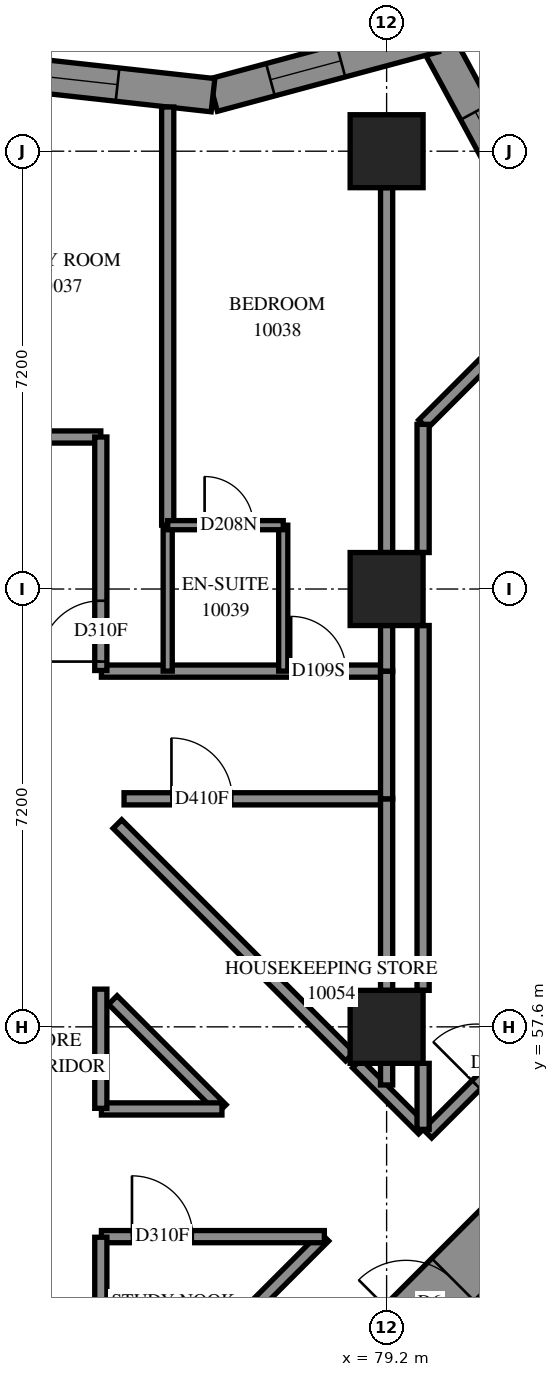
"""IFC4 building model, lengths in metres.
Left out: names, types, materials, properties, quantities, classifications, styles, units other than length and angle.
Written with IfcOpenShell. Run it as: python <this file> out.ifc"""

import sys

from ifc_helpers import new_model, si_unit, direction, frame, frame_2d, origin, origin_2d, place, context, subcontext, project, spatial, polyline, rectangle, outline, extrude, element, fill, save


model = new_model("IFC4")
c1 = context("Model", 3, precision=1e-05, world=origin(), true_north=direction((0.0, 1.0)))
c2 = subcontext(c1, "Body", "Model", "MODEL_VIEW")
j1 = project(units=[si_unit("LENGTHUNIT", "METRE"), si_unit("PLANEANGLEUNIT", "RADIAN")], contexts=[c1])
p1 = place(None, origin())
s1 = spatial("IfcSite", under=j1, at=p1, CompositionType="ELEMENT")
p2 = place(p1, origin())
s2 = spatial("IfcBuilding", under=s1, at=p2, CompositionType="ELEMENT")
p3 = place(p2, frame((0.0, 0.0, 40.6)))
s3 = spatial("IfcBuildingStorey", under=s2, at=p3, CompositionType="ELEMENT", Elevation=40.6)
for number, where, z_axis, x_axis in (
    (1, (79.2, 57.6, 0.0), (0.0, 0.0, 1.0), (1.0, 0.0, 0.0)),
    (2, (79.2, 64.8, 0.0), (0.0, 0.0, 1.0), (1.0, 0.0, 0.0)),
    (3, (79.2, 72.0, 0.0), (0.0, 0.0, 1.0), (1.0, 0.0, 0.0)),
):
    element("IfcColumn", number, at=place(p3, frame(where, z_axis=z_axis, x_axis=x_axis)), inside=s3, PredefinedType="COLUMN", context=c2, shape_type="SweptSolid", body=[
        extrude(rectangle(XDim=1.2, YDim=1.2, at=origin_2d()), origin(), (0.0, 0.0, 1.0), 3.1),
    ])
p4 = place(p3, frame((76.301, 49.443, -0.3), z_axis=(0.0, 0.0, 1.0), x_axis=(0.7071067812, 0.7071067812, 0.0)))
e4 = element("IfcWall", 4, at=p4, inside=s3, PredefinedType="SHEAR", context=c2, shape_type="SweptSolid", body=[
    extrude(rectangle(XDim=14.4, YDim=1.0, at=frame_2d((7.2, 0.0))), origin(), (0.0, 0.0, 1.0), 2.7),
])
p5 = place(p4, frame((4.55, 0.0, 0.3)))
e5 = element("IfcOpeningElement", 5, at=p5, cuts=e4, PredefinedType="OPENING", context=c2, shape_type="SweptSolid", body=[
    extrude(rectangle(XDim=1.1, YDim=2.1, at=frame_2d((0.55, 1.05))), frame((0.0, 0.51, 0.0), z_axis=(0.0, -1.0, 0.0), x_axis=(1.0, 0.0, 0.0)), (0.0, 0.0, 1.0), 1.02),
])
p6 = place(p4, frame((11.35, 0.0, 0.3)))
e6 = element("IfcOpeningElement", 6, at=p6, cuts=e4, PredefinedType="OPENING", context=c2, shape_type="SweptSolid", body=[
    extrude(rectangle(XDim=1.1, YDim=2.1, at=frame_2d((0.55, 1.05))), frame((0.0, 0.51, 0.0), z_axis=(0.0, -1.0, 0.0), x_axis=(1.0, 0.0, 0.0)), (0.0, 0.0, 1.0), 1.02),
])
p7 = place(p3, frame((81.611, 70.891, 0.0), z_axis=(0.0, 0.0, 1.0), x_axis=(-0.4761692104, 0.8793536735, 0.0)))
e7 = element("IfcWall", 7, at=p7, inside=s3, PredefinedType="SOLIDWALL", context=c2, shape_type="SweptSolid", body=[
    extrude(outline(polyline([(0.057, -0.275), (3.639, -0.275), (3.204, 0.275), (-0.057, 0.275), (0.057, -0.275)])), origin(), (0.0, 0.0, 1.0), 3.1),
])
p8 = place(p7, frame((0.798, 0.0, 0.5)))
e8 = element("IfcOpeningElement", 8, at=p8, cuts=e7, PredefinedType="OPENING", context=c2, shape_type="SweptSolid", body=[
    extrude(rectangle(XDim=1.2, YDim=2.45, at=frame_2d((0.6, 1.225))), frame((0.0, 0.285, 0.0), z_axis=(0.0, -1.0, 0.0), x_axis=(1.0, 0.0, 0.0)), (0.0, 0.0, 1.0), 0.57),
])
p9 = place(p3, frame((79.982, 73.899, 0.0), z_axis=(0.0, 0.0, 1.0), x_axis=(-0.9656880232, -0.259704913, 0.0)))
e9 = element("IfcWall", 9, at=p9, inside=s3, PredefinedType="SOLIDWALL", context=c2, shape_type="SweptSolid", body=[
    extrude(outline(polyline([(-0.217, -0.275), (3.714, -0.275), (3.818, 0.275), (0.217, 0.275), (-0.217, -0.275)])), origin(), (0.0, 0.0, 1.0), 3.1),
])
p10 = place(p9, frame((1.588, 0.0, 0.5)))
e10 = element("IfcOpeningElement", 10, at=p10, cuts=e9, PredefinedType="OPENING", context=c2, shape_type="SweptSolid", body=[
    extrude(rectangle(XDim=1.2, YDim=2.45, at=frame_2d((0.6, 1.225))), frame((0.0, 0.285, 0.0), z_axis=(0.0, -1.0, 0.0), x_axis=(1.0, 0.0, 0.0)), (0.0, 0.0, 1.0), 0.57),
])
p11 = place(p3, frame((76.345, 72.921, 0.0), z_axis=(0.0, 0.0, 1.0), x_axis=(-0.9939087915, 0.1102057815, 0.0)))
e11 = element("IfcWall", 11, at=p11, inside=s3, PredefinedType="SOLIDWALL", context=c2, shape_type="SweptSolid", body=[
    extrude(outline(polyline([(0.052, -0.275), (3.872, -0.275), (3.811, 0.275), (-0.052, 0.275), (0.052, -0.275)])), origin(), (0.0, 0.0, 1.0), 3.1),
])
p12 = place(p11, frame((1.58, 0.0, 0.5)))
e12 = element("IfcOpeningElement", 12, at=p12, cuts=e11, PredefinedType="OPENING", context=c2, shape_type="SweptSolid", body=[
    extrude(rectangle(XDim=1.2, YDim=2.45, at=frame_2d((0.6, 1.225))), frame((0.0, 0.285, 0.0), z_axis=(0.0, -1.0, 0.0), x_axis=(1.0, 0.0, 0.0)), (0.0, 0.0, 1.0), 0.57),
])
p13 = place(p3, frame((55.1, 67.3, 0.0), z_axis=(0.0, 0.0, 1.0), x_axis=(1.0, 0.0, 0.0)))
e13 = element("IfcWall", 13, at=p13, inside=s3, PredefinedType="PARTITIONING", context=c2, shape_type="SweptSolid", body=[
    extrude(rectangle(XDim=19.4, YDim=0.2, at=frame_2d((9.7, 0.0))), origin(), (0.0, 0.0, 1.0), 3.1),
])
p14 = place(p13, frame((6.399, 0.0, 0.0)))
e14 = element("IfcOpeningElement", 14, at=p14, cuts=e13, PredefinedType="OPENING", context=c2, shape_type="SweptSolid", body=[
    extrude(rectangle(XDim=0.9, YDim=2.1, at=frame_2d((0.45, 1.05))), frame((0.0, 0.11, 0.0), z_axis=(0.0, -1.0, 0.0), x_axis=(1.0, 0.0, 0.0)), (0.0, 0.0, 1.0), 0.22),
])
p15 = place(p13, frame((13.599, 0.0, 0.0)))
e15 = element("IfcOpeningElement", 15, at=p15, cuts=e13, PredefinedType="OPENING", context=c2, shape_type="SweptSolid", body=[
    extrude(rectangle(XDim=0.9, YDim=2.1, at=frame_2d((0.45, 1.05))), frame((0.0, 0.11, 0.0), z_axis=(0.0, -1.0, 0.0), x_axis=(1.0, 0.0, 0.0)), (0.0, 0.0, 1.0), 0.22),
])
p16 = place(p3, frame((79.871, 55.843, 0.0), z_axis=(0.0, 0.0, 1.0), x_axis=(0.7071067812, 0.7071067812, 0.0)))
e16 = element("IfcWall", 16, at=p16, inside=s3, PredefinedType="PARTITIONING", context=c2, shape_type="SweptSolid", body=[
    extrude(rectangle(XDim=9.85, YDim=0.2, at=frame_2d((4.925, 0.0))), origin(), (0.0, 0.0, 1.0), 3.1),
])
p17 = place(p16, frame((1.135, 0.0, 0.0)))
e17 = element("IfcOpeningElement", 17, at=p17, cuts=e16, PredefinedType="OPENING", context=c2, shape_type="SweptSolid", body=[
    extrude(rectangle(XDim=1.0, YDim=2.1, at=frame_2d((0.5, 1.05))), frame((0.0, 0.11, 0.0), z_axis=(0.0, -1.0, 0.0), x_axis=(1.0, 0.0, 0.0)), (0.0, 0.0, 1.0), 0.22),
])
p18 = place(p3, frame((75.6, 65.85, 0.0), z_axis=(0.0, 0.0, 1.0), x_axis=(0.0, 1.0, 0.0)))
e18 = element("IfcWall", 18, at=p18, inside=s3, PredefinedType="PARTITIONING", context=c2, shape_type="SweptSolid", body=[
    extrude(rectangle(XDim=6.877, YDim=0.2, at=frame_2d((3.438, 0.0))), origin(), (0.0, 0.0, 1.0), 3.1),
])
for number, where, z_axis, x_axis in (
    (19, (79.2, 65.4, 0.0), (0.0, 0.0, 1.0), (0.0, 1.0, 0.0)),
    (20, (79.8, 58.2, 0.0), (0.0, 0.0, 1.0), (0.0, 1.0, 0.0)),
):
    element("IfcWall", number, at=place(p3, frame(where, z_axis=z_axis, x_axis=x_axis)), inside=s3, PredefinedType="PARTITIONING", context=c2, shape_type="SweptSolid", body=[
        extrude(rectangle(XDim=6.0, YDim=0.2, at=frame_2d((3.0, 0.0))), origin(), (0.0, 0.0, 1.0), 3.1),
    ])
p19 = place(p3, frame((74.773, 60.935, 0.0), z_axis=(0.0, 0.0, 1.0), x_axis=(0.7071067812, -0.7071067812, 0.0)))
e21 = element("IfcWall", 21, at=p19, inside=s3, PredefinedType="PARTITIONING", context=c2, shape_type="SweptSolid", body=[
    extrude(rectangle(XDim=5.408, YDim=0.2, at=frame_2d((2.704, 0.0))), origin(), (0.0, 0.0, 1.0), 3.1),
])
p20 = place(p3, frame((74.517, 50.489, 0.0), z_axis=(0.0, 0.0, 1.0), x_axis=(0.7071067812, 0.7071067812, 0.0)))
e22 = element("IfcWall", 22, at=p20, inside=s3, PredefinedType="PARTITIONING", context=c2, shape_type="SweptSolid", body=[
    extrude(rectangle(XDim=5.176, YDim=0.2, at=frame_2d((2.588, 0.0))), origin(), (0.0, 0.0, 1.0), 3.1),
])
p21 = place(p3, frame((74.51, 63.45, 0.0), z_axis=(0.0, 0.0, 1.0), x_axis=(1.0, 0.0, 0.0)))
e23 = element("IfcWall", 23, at=p21, inside=s3, PredefinedType="PARTITIONING", context=c2, shape_type="SweptSolid", body=[
    extrude(rectangle(XDim=4.69, YDim=0.2, at=frame_2d((2.345, 0.0))), origin(), (0.0, 0.0, 1.0), 3.1),
])
p22 = place(p21, frame((3.12, 0.0, 0.0)))
e24 = element("IfcOpeningElement", 24, at=p22, cuts=e23, PredefinedType="OPENING", context=c2, shape_type="SweptSolid", body=[
    extrude(rectangle(XDim=0.9, YDim=2.1, at=frame_2d((0.45, 1.05))), frame((0.0, 0.11, 0.0), z_axis=(0.0, -1.0, 0.0), x_axis=(1.0, 0.0, 0.0)), (0.0, 0.0, 1.0), 0.22),
])
p23 = place(p3, frame((74.882, 61.35, 0.0), z_axis=(0.0, 0.0, 1.0), x_axis=(1.0, 0.0, 0.0)))
e25 = element("IfcWall", 25, at=p23, inside=s3, PredefinedType="PARTITIONING", context=c2, shape_type="SweptSolid", body=[
    extrude(rectangle(XDim=4.318, YDim=0.2, at=frame_2d((2.159, 0.0))), origin(), (0.0, 0.0, 1.0), 3.1),
])
p24 = place(p23, frame((0.78, 0.0, 0.0)))
e26 = element("IfcOpeningElement", 26, at=p24, cuts=e25, PredefinedType="OPENING", context=c2, shape_type="SweptSolid", body=[
    extrude(rectangle(XDim=1.0, YDim=2.1, at=frame_2d((0.5, 1.05))), frame((0.0, 0.11, 0.0), z_axis=(0.0, -1.0, 0.0), x_axis=(1.0, 0.0, 0.0)), (0.0, 0.0, 1.0), 0.22),
])
p25 = place(p3, frame((74.5, 63.46, 0.0), z_axis=(0.0, 0.0, 1.0), x_axis=(0.0, 1.0, 0.0)))
e27 = element("IfcWall", 27, at=p25, inside=s3, PredefinedType="PARTITIONING", context=c2, shape_type="SweptSolid", body=[
    extrude(rectangle(XDim=3.84, YDim=0.2, at=frame_2d((1.92, 0.0))), origin(), (0.0, 0.0, 1.0), 3.1),
])
p26 = place(p25, frame((0.147, 0.0, 0.0)))
e28 = element("IfcOpeningElement", 28, at=p26, cuts=e27, PredefinedType="OPENING", context=c2, shape_type="SweptSolid", body=[
    extrude(rectangle(XDim=1.0, YDim=2.1, at=frame_2d((0.5, 1.05))), frame((0.0, 0.11, 0.0), z_axis=(0.0, -1.0, 0.0), x_axis=(1.0, 0.0, 0.0)), (0.0, 0.0, 1.0), 0.22),
])
p27 = place(p3, frame((74.51, 54.15, 0.0), z_axis=(0.0, 0.0, 1.0), x_axis=(1.0, 0.0, 0.0)))
e29 = element("IfcWall", 29, at=p27, inside=s3, PredefinedType="PARTITIONING", context=c2, shape_type="SweptSolid", body=[
    extrude(rectangle(XDim=3.666, YDim=0.2, at=frame_2d((1.833, 0.0))), origin(), (0.0, 0.0, 1.0), 3.1),
])
p28 = place(p27, frame((0.502, 0.0, 0.0)))
e30 = element("IfcOpeningElement", 30, at=p28, cuts=e29, PredefinedType="OPENING", context=c2, shape_type="SweptSolid", body=[
    extrude(rectangle(XDim=1.0, YDim=2.1, at=frame_2d((0.5, 1.05))), frame((0.0, 0.11, 0.0), z_axis=(0.0, -1.0, 0.0), x_axis=(1.0, 0.0, 0.0)), (0.0, 0.0, 1.0), 0.22),
])
p29 = place(p3, frame((74.5, 50.496, 0.0), z_axis=(0.0, 0.0, 1.0), x_axis=(0.0, 1.0, 0.0)))
e31 = element("IfcWall", 31, at=p29, inside=s3, PredefinedType="PARTITIONING", context=c2, shape_type="SweptSolid", body=[
    extrude(rectangle(XDim=3.644, YDim=0.2, at=frame_2d((1.822, 0.0))), origin(), (0.0, 0.0, 1.0), 3.1),
])
p30 = place(p3, frame((79.799, 67.509, 0.0), z_axis=(0.0, 0.0, 1.0), x_axis=(0.7070926216, 0.7071209405, 0.0)))
e32 = element("IfcWall", 32, at=p30, inside=s3, PredefinedType="PARTITIONING", context=c2, shape_type="SweptSolid", body=[
    extrude(rectangle(XDim=3.531, YDim=0.2, at=frame_2d((1.766, 0.0))), origin(), (0.0, 0.0, 1.0), 3.1),
])
p31 = place(p3, frame((79.2, 58.2, 0.0), z_axis=(0.0, 0.0, 1.0), x_axis=(0.0, 1.0, 0.0)))
e33 = element("IfcWall", 33, at=p31, inside=s3, PredefinedType="PARTITIONING", context=c2, shape_type="SweptSolid", body=[
    extrude(rectangle(XDim=3.15, YDim=0.2, at=frame_2d((1.575, 0.0))), origin(), (0.0, 0.0, 1.0), 3.1),
])
p32 = place(p3, frame((74.697, 58.041, 0.0), z_axis=(0.0, 0.0, 1.0), x_axis=(0.7071067812, -0.7071067812, 0.0)))
e34 = element("IfcWall", 34, at=p32, inside=s3, PredefinedType="PARTITIONING", context=c2, shape_type="SweptSolid", body=[
    extrude(rectangle(XDim=2.534, YDim=0.2, at=frame_2d((1.267, 0.0))), origin(), (0.0, 0.0, 1.0), 3.1),
])
for number, where, z_axis, x_axis in (
    (35, (75.6, 63.45, 0.0), (0.0, 0.0, 1.0), (0.0, 1.0, 0.0)),
    (36, (77.5, 63.45, 0.0), (0.0, 0.0, 1.0), (0.0, 1.0, 0.0)),
):
    element("IfcWall", number, at=place(p3, frame(where, z_axis=z_axis, x_axis=x_axis)), inside=s3, PredefinedType="PARTITIONING", context=c2, shape_type="SweptSolid", body=[
        extrude(rectangle(XDim=2.4, YDim=0.15, at=frame_2d((1.2, 0.0))), origin(), (0.0, 0.0, 1.0), 3.1),
    ])
p33 = place(p3, frame((79.8, 65.4, 0.0), z_axis=(0.0, 0.0, 1.0), x_axis=(0.0, 1.0, 0.0)))
e37 = element("IfcWall", 37, at=p33, inside=s3, PredefinedType="PARTITIONING", context=c2, shape_type="SweptSolid", body=[
    extrude(rectangle(XDim=2.108, YDim=0.2, at=frame_2d((1.054, 0.0))), origin(), (0.0, 0.0, 1.0), 3.1),
])
p34 = place(p3, frame((79.2, 61.35, 0.0), z_axis=(0.0, 0.0, 1.0), x_axis=(0.0, 1.0, 0.0)))
e38 = element("IfcWall", 38, at=p34, inside=s3, PredefinedType="PARTITIONING", context=c2, shape_type="SweptSolid", body=[
    extrude(rectangle(XDim=2.1, YDim=0.2, at=frame_2d((1.05, 0.0))), origin(), (0.0, 0.0, 1.0), 3.1),
])
p35 = place(p3, frame((74.51, 56.25, 0.0), z_axis=(0.0, 0.0, 1.0), x_axis=(1.0, 0.0, 0.0)))
e39 = element("IfcWall", 39, at=p35, inside=s3, PredefinedType="PARTITIONING", context=c2, shape_type="SweptSolid", body=[
    extrude(rectangle(XDim=1.982, YDim=0.2, at=frame_2d((0.991, 0.0))), origin(), (0.0, 0.0, 1.0), 3.1),
])
p36 = place(p3, frame((74.5, 56.26, 0.0), z_axis=(0.0, 0.0, 1.0), x_axis=(0.0, 1.0, 0.0)))
e40 = element("IfcWall", 40, at=p36, inside=s3, PredefinedType="PARTITIONING", context=c2, shape_type="SweptSolid", body=[
    extrude(rectangle(XDim=1.96, YDim=0.2, at=frame_2d((0.98, 0.0))), origin(), (0.0, 0.0, 1.0), 3.1),
])
p37 = place(p3, frame((75.6, 65.85, 0.0), z_axis=(0.0, 0.0, 1.0), x_axis=(1.0, 0.0, 0.0)))
e41 = element("IfcWall", 41, at=p37, inside=s3, PredefinedType="PARTITIONING", context=c2, shape_type="SweptSolid", body=[
    extrude(rectangle(XDim=1.9, YDim=0.15, at=frame_2d((0.95, 0.0))), origin(), (0.0, 0.0, 1.0), 3.1),
])
p38 = place(p37, frame((0.607, 0.0, 0.0)))
e42 = element("IfcOpeningElement", 42, at=p38, cuts=e41, PredefinedType="OPENING", context=c2, shape_type="SweptSolid", body=[
    extrude(rectangle(XDim=0.8, YDim=2.1, at=frame_2d((0.4, 1.05))), frame((0.0, 0.085, 0.0), z_axis=(0.0, -1.0, 0.0), x_axis=(1.0, 0.0, 0.0)), (0.0, 0.0, 1.0), 0.17),
])
p39 = place(p3, frame((78.711, 56.997, 0.0), z_axis=(0.0, 0.0, 1.0), x_axis=(0.7071067812, -0.7071067812, 0.0)))
e43 = element("IfcWall", 43, at=p39, inside=s3, PredefinedType="PARTITIONING", context=c2, shape_type="SweptSolid", body=[
    extrude(rectangle(XDim=1.536, YDim=0.2, at=frame_2d((0.768, 0.0))), origin(), (0.0, 0.0, 1.0), 3.1),
])
p40 = place(p3, frame((79.8, 55.914, 0.0), z_axis=(0.0, 0.0, 1.0), x_axis=(0.0, 1.0, 0.0)))
e44 = element("IfcWall", 44, at=p40, inside=s3, PredefinedType="PARTITIONING", context=c2, shape_type="SweptSolid", body=[
    extrude(rectangle(XDim=1.086, YDim=0.2, at=frame_2d((0.543, 0.0))), origin(), (0.0, 0.0, 1.0), 3.1),
])
p41 = place(p3, frame((79.2, 63.45, 0.0), z_axis=(0.0, 0.0, 1.0), x_axis=(0.0, 1.0, 0.0)))
e45 = element("IfcWall", 45, at=p41, inside=s3, PredefinedType="PARTITIONING", context=c2, shape_type="SweptSolid", body=[
    extrude(rectangle(XDim=0.75, YDim=0.2, at=frame_2d((0.375, 0.0))), origin(), (0.0, 0.0, 1.0), 3.1),
])
p42 = place(p3, frame((79.2, 56.644, 0.0), z_axis=(0.0, 0.0, 1.0), x_axis=(0.0, 1.0, 0.0)))
e46 = element("IfcWall", 46, at=p42, inside=s3, PredefinedType="PARTITIONING", context=c2, shape_type="SweptSolid", body=[
    extrude(rectangle(XDim=0.356, YDim=0.2, at=frame_2d((0.178, 0.0))), origin(), (0.0, 0.0, 1.0), 3.1),
])
p43 = place(p8, origin())
e47 = element("IfcWindow", 47, at=p43, inside=s3, PartitioningType="SINGLE_PANEL", PredefinedType="WINDOW", context=c2, shape_type="SweptSolid", body=[
    extrude(rectangle(XDim=1.2, YDim=2.45, at=frame_2d((0.6, 1.225))), frame((0.0, 0.155, 0.0), z_axis=(0.0, -1.0, 0.0), x_axis=(1.0, 0.0, 0.0)), (0.0, 0.0, 1.0), 0.06),
])
fill(e8, e47)
p44 = place(p10, origin())
e48 = element("IfcWindow", 48, at=p44, inside=s3, PartitioningType="SINGLE_PANEL", PredefinedType="WINDOW", context=c2, shape_type="SweptSolid", body=[
    extrude(rectangle(XDim=1.2, YDim=2.45, at=frame_2d((0.6, 1.225))), frame((0.0, 0.155, 0.0), z_axis=(0.0, -1.0, 0.0), x_axis=(1.0, 0.0, 0.0)), (0.0, 0.0, 1.0), 0.06),
])
fill(e10, e48)
p45 = place(p12, origin())
e49 = element("IfcWindow", 49, at=p45, inside=s3, PartitioningType="SINGLE_PANEL", PredefinedType="WINDOW", context=c2, shape_type="SweptSolid", body=[
    extrude(rectangle(XDim=1.2, YDim=2.45, at=frame_2d((0.6, 1.225))), frame((0.0, 0.155, 0.0), z_axis=(0.0, -1.0, 0.0), x_axis=(1.0, 0.0, 0.0)), (0.0, 0.0, 1.0), 0.06),
])
fill(e12, e49)
p46 = place(p5, origin())
e50 = element("IfcDoor", 50, at=p46, inside=s3, OperationType="DOUBLE_DOOR_SINGLE_SWING", PredefinedType="DOOR", context=c2, shape_type="SweptSolid", body=[
    extrude(rectangle(XDim=1.1, YDim=2.1, at=frame_2d((0.55, 1.05))), frame((0.0, 0.025, 0.0), z_axis=(0.0, -1.0, 0.0), x_axis=(1.0, 0.0, 0.0)), (0.0, 0.0, 1.0), 0.05),
])
fill(e5, e50)
p47 = place(p28, origin())
e51 = element("IfcDoor", 51, at=p47, inside=s3, OperationType="SINGLE_SWING_RIGHT", PredefinedType="DOOR", context=c2, shape_type="SweptSolid", body=[
    extrude(rectangle(XDim=1.0, YDim=2.1, at=frame_2d((0.5, 1.05))), frame((0.0, 0.025, 0.0), z_axis=(0.0, -1.0, 0.0), x_axis=(1.0, 0.0, 0.0)), (0.0, 0.0, 1.0), 0.05),
])
fill(e30, e51)
p48 = place(p26, origin())
e52 = element("IfcDoor", 52, at=p48, inside=s3, OperationType="SINGLE_SWING_RIGHT", PredefinedType="DOOR", context=c2, shape_type="SweptSolid", body=[
    extrude(rectangle(XDim=1.0, YDim=2.1, at=frame_2d((0.5, 1.05))), frame((0.0, 0.025, 0.0), z_axis=(0.0, -1.0, 0.0), x_axis=(1.0, 0.0, 0.0)), (0.0, 0.0, 1.0), 0.05),
])
fill(e28, e52)
p49 = place(p22, origin())
e53 = element("IfcDoor", 53, at=p49, inside=s3, OperationType="SINGLE_SWING_LEFT", PredefinedType="DOOR", context=c2, shape_type="SweptSolid", body=[
    extrude(rectangle(XDim=0.9, YDim=2.1, at=frame_2d((0.45, 1.05))), frame((0.0, 0.025, 0.0), z_axis=(0.0, -1.0, 0.0), x_axis=(1.0, 0.0, 0.0)), (0.0, 0.0, 1.0), 0.05),
])
fill(e24, e53)
p50 = place(p38, origin())
e54 = element("IfcDoor", 54, at=p50, inside=s3, OperationType="SINGLE_SWING_RIGHT", PredefinedType="DOOR", context=c2, shape_type="SweptSolid", body=[
    extrude(rectangle(XDim=0.8, YDim=2.1, at=frame_2d((0.4, 1.05))), frame((0.0, 0.025, 0.0), z_axis=(0.0, -1.0, 0.0), x_axis=(1.0, 0.0, 0.0)), (0.0, 0.0, 1.0), 0.05),
])
fill(e42, e54)
p51 = place(p24, origin())
e55 = element("IfcDoor", 55, at=p51, inside=s3, OperationType="SINGLE_SWING_RIGHT", PredefinedType="DOOR", context=c2, shape_type="SweptSolid", body=[
    extrude(rectangle(XDim=1.0, YDim=2.1, at=frame_2d((0.5, 1.05))), frame((0.0, 0.025, 0.0), z_axis=(0.0, -1.0, 0.0), x_axis=(1.0, 0.0, 0.0)), (0.0, 0.0, 1.0), 0.05),
])
fill(e26, e55)
p52 = place(p17, origin())
e56 = element("IfcDoor", 56, at=p52, inside=s3, OperationType="SINGLE_SWING_RIGHT", PredefinedType="DOOR", context=c2, shape_type="SweptSolid", body=[
    extrude(rectangle(XDim=1.0, YDim=2.1, at=frame_2d((0.5, 1.05))), frame((0.0, 0.025, 0.0), z_axis=(0.0, -1.0, 0.0), x_axis=(1.0, 0.0, 0.0)), (0.0, 0.0, 1.0), 0.05),
])
fill(e17, e56)
save(model, sys.argv[1])
